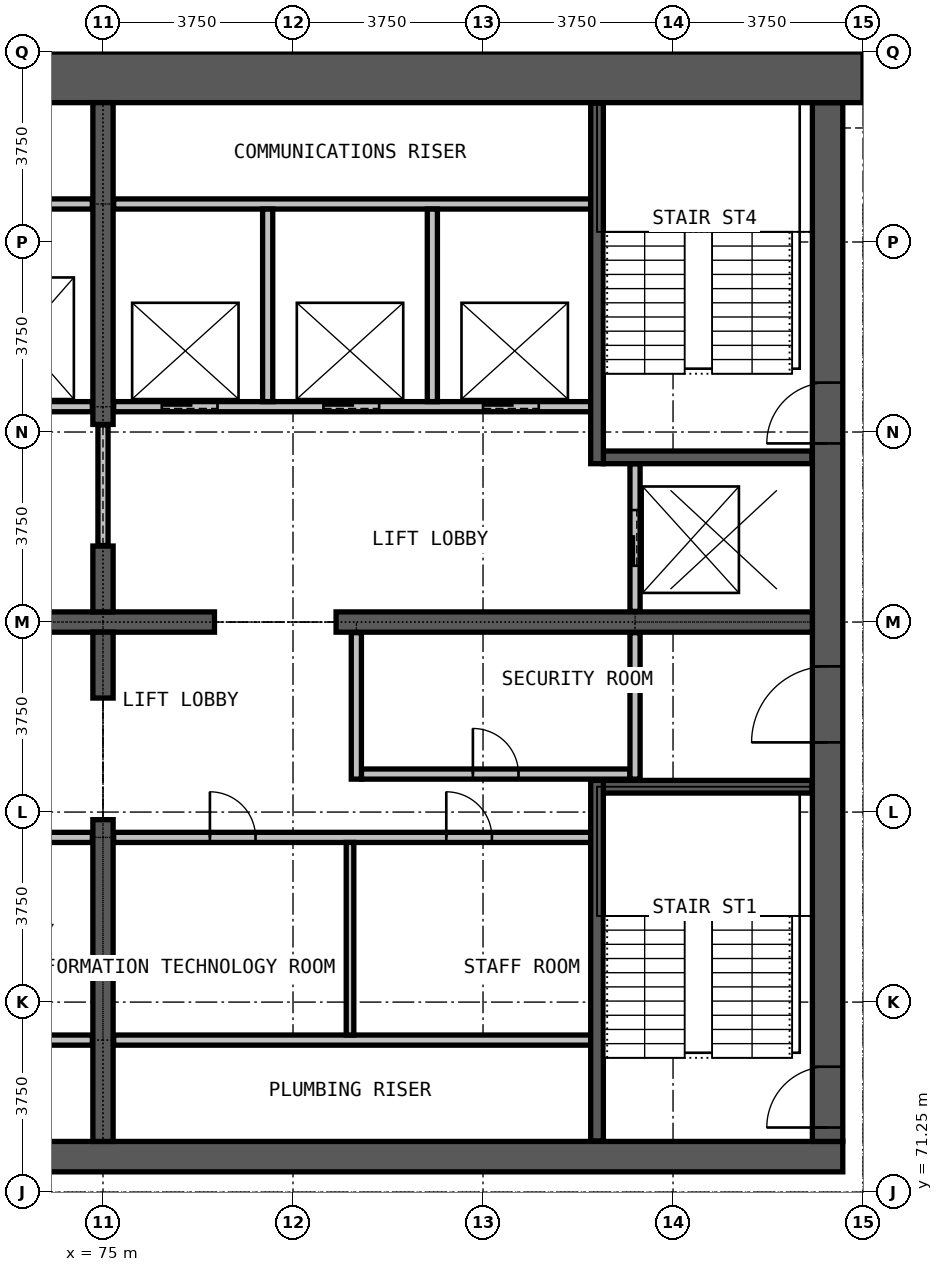
"""IFC4 building model, lengths in metres.
Left out: names, types, materials, properties, quantities, classifications, styles, units other than length and angle.
Written with IfcOpenShell. Run it as: python <this file> out.ifc"""

import sys

from ifc_helpers import new_model, si_unit, direction, frame, frame_2d, origin, place, context, subcontext, project, spatial, rectangle, extrude, element, fill, save


model = new_model("IFC4")
c1 = context("Model", 3, precision=1e-05, world=origin(), true_north=direction((0.0, 1.0)))
c2 = subcontext(c1, "Body", "Model", "MODEL_VIEW")
j1 = project(units=[si_unit("LENGTHUNIT", "METRE"), si_unit("PLANEANGLEUNIT", "RADIAN")], contexts=[c1])
p1 = place(None, origin())
s1 = spatial("IfcSite", under=j1, at=p1, CompositionType="ELEMENT")
p2 = place(p1, origin())
s2 = spatial("IfcBuilding", under=s1, at=p2, CompositionType="ELEMENT")
p3 = place(p2, frame((0.0, 0.0, 206.7)))
s3 = spatial("IfcBuildingStorey", under=s2, at=p3, CompositionType="ELEMENT", Elevation=206.7)
p4 = place(p3, frame((60.4, 71.95, 0.0), z_axis=(0.0, 0.0, 1.0), x_axis=(1.0, 0.0, 0.0)))
e1 = element("IfcWall", 1, at=p4, inside=s3, PredefinedType="SHEAR", context=c2, shape_type="SweptSolid", body=[
    extrude(rectangle(XDim=29.2, YDim=0.6, at=frame_2d((14.6, 0.0))), origin(), (0.0, 0.0, 1.0), 3.6),
])
p5 = place(p3, frame((89.3, 72.25, 0.0), z_axis=(0.0, 0.0, 1.0), x_axis=(0.0, 1.0, 0.0)))
e2 = element("IfcWall", 2, at=p5, inside=s3, PredefinedType="SHEAR", context=c2, shape_type="SweptSolid", body=[
    extrude(rectangle(XDim=20.5, YDim=0.6, at=frame_2d((10.25, 0.0))), origin(), (0.0, 0.0, 1.0), 3.6),
])
p6 = place(p5, frame((0.275, 0.0, 0.0)))
e3 = element("IfcOpeningElement", 3, at=p6, cuts=e2, PredefinedType="OPENING", context=c2, shape_type="SweptSolid", body=[
    extrude(rectangle(XDim=1.2, YDim=2.2, at=frame_2d((0.6, 1.1))), frame((0.0, 0.31, 0.0), z_axis=(0.0, -1.0, 0.0), x_axis=(1.0, 0.0, 0.0)), (0.0, 0.0, 1.0), 0.62),
])
p7 = place(p5, frame((13.775, 0.0, 0.0)))
e4 = element("IfcOpeningElement", 4, at=p7, cuts=e2, PredefinedType="OPENING", context=c2, shape_type="SweptSolid", body=[
    extrude(rectangle(XDim=1.2, YDim=2.2, at=frame_2d((0.6, 1.1))), frame((0.0, 0.31, 0.0), z_axis=(0.0, -1.0, 0.0), x_axis=(1.0, 0.0, 0.0)), (0.0, 0.0, 1.0), 0.62),
])
p8 = place(p5, frame((7.875, 0.0, 0.0)))
e5 = element("IfcOpeningElement", 5, at=p8, cuts=e2, PredefinedType="OPENING", context=c2, shape_type="SweptSolid", body=[
    extrude(rectangle(XDim=1.5, YDim=2.2, at=frame_2d((0.75, 1.1))), frame((0.0, 0.31, 0.0), z_axis=(0.0, -1.0, 0.0), x_axis=(1.0, 0.0, 0.0)), (0.0, 0.0, 1.0), 0.62),
])
p9 = place(p3, frame((90.0, 93.25, 0.0), z_axis=(0.0, 0.0, 1.0), x_axis=(-1.0, 0.0, 0.0)))
e6 = element("IfcWall", 6, at=p9, inside=s3, PredefinedType="SHEAR", context=c2, shape_type="SweptSolid", body=[
    extrude(rectangle(XDim=30.0, YDim=1.0, at=frame_2d((15.0, 0.0))), origin(), (0.0, 0.0, 1.0), 3.6),
])
p10 = place(p3, frame((72.8, 82.5, 0.0), z_axis=(0.0, 0.0, 1.0), x_axis=(1.0, 0.0, 0.0)))
e7 = element("IfcWall", 7, at=p10, inside=s3, PredefinedType="SHEAR", context=c2, shape_type="SweptSolid", body=[
    extrude(rectangle(XDim=4.4, YDim=0.4, at=frame_2d((2.2, 0.0))), origin(), (0.0, 0.0, 1.0), 3.6),
])
p11 = place(p3, frame((79.6, 82.5, 0.0), z_axis=(0.0, 0.0, 1.0), x_axis=(1.0, 0.0, 0.0)))
e8 = element("IfcWall", 8, at=p11, inside=s3, PredefinedType="SHEAR", context=c2, shape_type="SweptSolid", body=[
    extrude(rectangle(XDim=9.4, YDim=0.4, at=frame_2d((4.7, 0.0))), origin(), (0.0, 0.0, 1.0), 3.6),
])
p12 = place(p3, frame((75.0, 72.25, 0.0), z_axis=(0.0, 0.0, 1.0), x_axis=(0.0, 1.0, 0.0)))
e9 = element("IfcWall", 9, at=p12, inside=s3, PredefinedType="SHEAR", context=c2, shape_type="SweptSolid", body=[
    extrude(rectangle(XDim=6.35, YDim=0.4, at=frame_2d((3.175, 0.0))), origin(), (0.0, 0.0, 1.0), 3.6),
])
for number, where, z_axis, x_axis in (
    (10, (75.0, 81.0, 0.0), (0.0, 0.0, 1.0), (0.0, 1.0, 0.0)),
    (11, (75.0, 82.7, 0.0), (0.0, 0.0, 1.0), (0.0, 1.0, 0.0)),
):
    element("IfcWall", number, at=place(p3, frame(where, z_axis=z_axis, x_axis=x_axis)), inside=s3, PredefinedType="SHEAR", context=c2, shape_type="SweptSolid", body=[
        extrude(rectangle(XDim=1.3, YDim=0.4, at=frame_2d((0.65, 0.0))), origin(), (0.0, 0.0, 1.0), 3.6),
    ])
p13 = place(p3, frame((75.0, 86.4, 0.0), z_axis=(0.0, 0.0, 1.0), x_axis=(0.0, 1.0, 0.0)))
e12 = element("IfcWall", 12, at=p13, inside=s3, PredefinedType="SHEAR", context=c2, shape_type="SweptSolid", body=[
    extrude(rectangle(XDim=6.35, YDim=0.4, at=frame_2d((3.175, 0.0))), origin(), (0.0, 0.0, 1.0), 3.6),
])
for number, where, z_axis, x_axis in (
    (13, (65.375, 74.25, 0.0), (0.0, 0.0, 1.0), (1.0, 0.0, 0.0)),
    (14, (75.21, 74.25, 0.0), (0.0, 0.0, 1.0), (1.0, 0.0, 0.0)),
):
    element("IfcWall", number, at=place(p3, frame(where, z_axis=z_axis, x_axis=x_axis)), inside=s3, PredefinedType="PARTITIONING", context=c2, shape_type="SweptSolid", body=[
        extrude(rectangle(XDim=9.415, YDim=0.2, at=frame_2d((4.708, 0.0))), origin(), (0.0, 0.0, 1.0), 3.3),
    ])
p14 = place(p3, frame((65.375, 78.25, 0.0), z_axis=(0.0, 0.0, 1.0), x_axis=(1.0, 0.0, 0.0)))
e15 = element("IfcWall", 15, at=p14, inside=s3, PredefinedType="PARTITIONING", context=c2, shape_type="SweptSolid", body=[
    extrude(rectangle(XDim=9.415, YDim=0.2, at=frame_2d((4.708, 0.0))), origin(), (0.0, 0.0, 1.0), 3.3),
])
p15 = place(p14, frame((1.0, 0.0, 0.0)))
e16 = element("IfcOpeningElement", 16, at=p15, cuts=e15, PredefinedType="OPENING", context=c2, shape_type="SweptSolid", body=[
    extrude(rectangle(XDim=0.9, YDim=2.2, at=frame_2d((0.45, 1.1))), frame((0.0, 0.11, 0.0), z_axis=(0.0, -1.0, 0.0), x_axis=(1.0, 0.0, 0.0)), (0.0, 0.0, 1.0), 0.22),
])
p16 = place(p14, frame((5.665, 0.0, 0.0)))
e17 = element("IfcOpeningElement", 17, at=p16, cuts=e15, PredefinedType="OPENING", context=c2, shape_type="SweptSolid", body=[
    extrude(rectangle(XDim=0.9, YDim=2.2, at=frame_2d((0.45, 1.1))), frame((0.0, 0.11, 0.0), z_axis=(0.0, -1.0, 0.0), x_axis=(1.0, 0.0, 0.0)), (0.0, 0.0, 1.0), 0.22),
])
p17 = place(p3, frame((75.21, 78.25, 0.0), z_axis=(0.0, 0.0, 1.0), x_axis=(1.0, 0.0, 0.0)))
e18 = element("IfcWall", 18, at=p17, inside=s3, PredefinedType="PARTITIONING", context=c2, shape_type="SweptSolid", body=[
    extrude(rectangle(XDim=9.415, YDim=0.2, at=frame_2d((4.708, 0.0))), origin(), (0.0, 0.0, 1.0), 3.3),
])
p18 = place(p17, frame((1.9, 0.0, 0.0)))
e19 = element("IfcOpeningElement", 19, at=p18, cuts=e18, PredefinedType="OPENING", context=c2, shape_type="SweptSolid", body=[
    extrude(rectangle(XDim=0.9, YDim=2.2, at=frame_2d((0.45, 1.1))), frame((0.0, 0.11, 0.0), z_axis=(0.0, -1.0, 0.0), x_axis=(1.0, 0.0, 0.0)), (0.0, 0.0, 1.0), 0.22),
])
p19 = place(p17, frame((6.565, 0.0, 0.0)))
e20 = element("IfcOpeningElement", 20, at=p19, cuts=e18, PredefinedType="OPENING", context=c2, shape_type="SweptSolid", body=[
    extrude(rectangle(XDim=0.9, YDim=2.2, at=frame_2d((0.45, 1.1))), frame((0.0, 0.11, 0.0), z_axis=(0.0, -1.0, 0.0), x_axis=(1.0, 0.0, 0.0)), (0.0, 0.0, 1.0), 0.22),
])
p20 = place(p3, frame((80.1, 79.5, 0.0), z_axis=(0.0, 0.0, 1.0), x_axis=(1.0, 0.0, 0.0)))
e21 = element("IfcWall", 21, at=p20, inside=s3, PredefinedType="PARTITIONING", context=c2, shape_type="SweptSolid", body=[
    extrude(rectangle(XDim=5.3, YDim=0.2, at=frame_2d((2.65, 0.0))), origin(), (0.0, 0.0, 1.0), 3.3),
])
p21 = place(p20, frame((2.2, 0.0, 0.0)))
e22 = element("IfcOpeningElement", 22, at=p21, cuts=e21, PredefinedType="OPENING", context=c2, shape_type="SweptSolid", body=[
    extrude(rectangle(XDim=0.9, YDim=2.2, at=frame_2d((0.45, 1.1))), frame((0.0, 0.11, 0.0), z_axis=(0.0, -1.0, 0.0), x_axis=(1.0, 0.0, 0.0)), (0.0, 0.0, 1.0), 0.22),
])
p22 = place(p3, frame((75.0, 84.01, 0.0), z_axis=(0.0, 0.0, 1.0), x_axis=(0.0, 1.0, 0.0)))
e23 = element("IfcWall", 23, at=p22, inside=s3, PredefinedType="PARTITIONING", context=c2, shape_type="SweptSolid", body=[
    extrude(rectangle(XDim=2.38, YDim=0.2, at=frame_2d((1.19, 0.0))), origin(), (0.0, 0.0, 1.0), 2.4),
])
for number, where, z_axis, x_axis in (
    (24, (80.0, 79.4, 0.0), (0.0, 0.0, 1.0), (0.0, 1.0, 0.0)),
    (25, (85.5, 79.4, 0.0), (0.0, 0.0, 1.0), (0.0, 1.0, 0.0)),
):
    element("IfcWall", number, at=place(p3, frame(where, z_axis=z_axis, x_axis=x_axis)), inside=s3, PredefinedType="PARTITIONING", context=c2, shape_type="SweptSolid", body=[
        extrude(rectangle(XDim=2.89, YDim=0.2, at=frame_2d((1.445, 0.0))), origin(), (0.0, 0.0, 1.0), 3.3),
    ])
p23 = place(p3, frame((79.875, 74.35, 0.0), z_axis=(0.0, 0.0, 1.0), x_axis=(0.0, 1.0, 0.0)))
e26 = element("IfcWall", 26, at=p23, inside=s3, PredefinedType="PARTITIONING", context=c2, shape_type="SweptSolid", body=[
    extrude(rectangle(XDim=3.8, YDim=0.15, at=frame_2d((1.9, 0.0))), origin(), (0.0, 0.0, 1.0), 3.3),
])
p24 = place(p3, frame((65.375, 86.75, 0.0), z_axis=(0.0, 0.0, 1.0), x_axis=(1.0, 0.0, 0.0)))
e27 = element("IfcWall", 27, at=p24, inside=s3, PredefinedType="PARTITIONING", context=c2, shape_type="SweptSolid", body=[
    extrude(rectangle(XDim=9.415, YDim=0.2, at=frame_2d((4.708, 0.0))), origin(), (0.0, 0.0, 1.0), 3.3),
])
p25 = place(p24, frame((1.0, 0.0, 0.0)))
e28 = element("IfcOpeningElement", 28, at=p25, cuts=e27, PredefinedType="OPENING", context=c2, shape_type="SweptSolid", body=[
    extrude(rectangle(XDim=1.1, YDim=2.2, at=frame_2d((0.55, 1.1))), frame((0.0, 0.11, 0.0), z_axis=(0.0, -1.0, 0.0), x_axis=(1.0, 0.0, 0.0)), (0.0, 0.0, 1.0), 0.22),
])
p26 = place(p24, frame((4.175, 0.0, 0.0)))
e29 = element("IfcOpeningElement", 29, at=p26, cuts=e27, PredefinedType="OPENING", context=c2, shape_type="SweptSolid", body=[
    extrude(rectangle(XDim=1.1, YDim=2.2, at=frame_2d((0.55, 1.1))), frame((0.0, 0.11, 0.0), z_axis=(0.0, -1.0, 0.0), x_axis=(1.0, 0.0, 0.0)), (0.0, 0.0, 1.0), 0.22),
])
p27 = place(p24, frame((7.325, 0.0, 0.0)))
e30 = element("IfcOpeningElement", 30, at=p27, cuts=e27, PredefinedType="OPENING", context=c2, shape_type="SweptSolid", body=[
    extrude(rectangle(XDim=1.1, YDim=2.2, at=frame_2d((0.55, 1.1))), frame((0.0, 0.11, 0.0), z_axis=(0.0, -1.0, 0.0), x_axis=(1.0, 0.0, 0.0)), (0.0, 0.0, 1.0), 0.22),
])
p28 = place(p3, frame((75.21, 86.75, 0.0), z_axis=(0.0, 0.0, 1.0), x_axis=(1.0, 0.0, 0.0)))
e31 = element("IfcWall", 31, at=p28, inside=s3, PredefinedType="PARTITIONING", context=c2, shape_type="SweptSolid", body=[
    extrude(rectangle(XDim=9.415, YDim=0.2, at=frame_2d((4.708, 0.0))), origin(), (0.0, 0.0, 1.0), 3.3),
])
p29 = place(p28, frame((0.95, 0.0, 0.0)))
e32 = element("IfcOpeningElement", 32, at=p29, cuts=e31, PredefinedType="OPENING", context=c2, shape_type="SweptSolid", body=[
    extrude(rectangle(XDim=1.1, YDim=2.2, at=frame_2d((0.55, 1.1))), frame((0.0, 0.11, 0.0), z_axis=(0.0, -1.0, 0.0), x_axis=(1.0, 0.0, 0.0)), (0.0, 0.0, 1.0), 0.22),
])
p30 = place(p28, frame((4.14, 0.0, 0.0)))
e33 = element("IfcOpeningElement", 33, at=p30, cuts=e31, PredefinedType="OPENING", context=c2, shape_type="SweptSolid", body=[
    extrude(rectangle(XDim=1.1, YDim=2.2, at=frame_2d((0.55, 1.1))), frame((0.0, 0.11, 0.0), z_axis=(0.0, -1.0, 0.0), x_axis=(1.0, 0.0, 0.0)), (0.0, 0.0, 1.0), 0.22),
])
p31 = place(p28, frame((7.29, 0.0, 0.0)))
e34 = element("IfcOpeningElement", 34, at=p31, cuts=e31, PredefinedType="OPENING", context=c2, shape_type="SweptSolid", body=[
    extrude(rectangle(XDim=1.1, YDim=2.2, at=frame_2d((0.55, 1.1))), frame((0.0, 0.11, 0.0), z_axis=(0.0, -1.0, 0.0), x_axis=(1.0, 0.0, 0.0)), (0.0, 0.0, 1.0), 0.22),
])
for number, where, z_axis, x_axis in (
    (35, (65.375, 90.75, 0.0), (0.0, 0.0, 1.0), (1.0, 0.0, 0.0)),
    (36, (75.21, 90.75, 0.0), (0.0, 0.0, 1.0), (1.0, 0.0, 0.0)),
):
    element("IfcWall", number, at=place(p3, frame(where, z_axis=z_axis, x_axis=x_axis)), inside=s3, PredefinedType="PARTITIONING", context=c2, shape_type="SweptSolid", body=[
        extrude(rectangle(XDim=9.415, YDim=0.2, at=frame_2d((4.708, 0.0))), origin(), (0.0, 0.0, 1.0), 3.3),
    ])
for number, where, z_axis, x_axis in (
    (37, (78.25, 86.85, 0.0), (0.0, 0.0, 1.0), (0.0, 1.0, 0.0)),
    (38, (81.5, 86.85, 0.0), (0.0, 0.0, 1.0), (0.0, 1.0, 0.0)),
):
    element("IfcWall", number, at=place(p3, frame(where, z_axis=z_axis, x_axis=x_axis)), inside=s3, PredefinedType="PARTITIONING", context=c2, shape_type="SweptSolid", body=[
        extrude(rectangle(XDim=3.8, YDim=0.2, at=frame_2d((1.9, 0.0))), origin(), (0.0, 0.0, 1.0), 3.3),
    ])
p32 = place(p3, frame((85.5, 82.71, 0.0), z_axis=(0.0, 0.0, 1.0), x_axis=(0.0, 1.0, 0.0)))
e39 = element("IfcWall", 39, at=p32, inside=s3, PredefinedType="PARTITIONING", context=c2, shape_type="SweptSolid", body=[
    extrude(rectangle(XDim=2.915, YDim=0.2, at=frame_2d((1.458, 0.0))), origin(), (0.0, 0.0, 1.0), 3.3),
])
p33 = place(p32, frame((0.9, 0.0, 0.0)))
e40 = element("IfcOpeningElement", 40, at=p33, cuts=e39, PredefinedType="OPENING", context=c2, shape_type="SweptSolid", body=[
    extrude(rectangle(XDim=1.1, YDim=2.2, at=frame_2d((0.55, 1.1))), frame((0.0, 0.11, 0.0), z_axis=(0.0, -1.0, 0.0), x_axis=(1.0, 0.0, 0.0)), (0.0, 0.0, 1.0), 0.22),
])
for number, where, z_axis, x_axis in (
    (41, (84.875, 79.25, 0.0), (0.0, 0.0, 1.0), (1.0, 0.0, 0.0)),
    (42, (84.875, 85.75, 0.0), (0.0, 0.0, 1.0), (1.0, 0.0, 0.0)),
):
    element("IfcWall", number, at=place(p3, frame(where, z_axis=z_axis, x_axis=x_axis)), inside=s3, PredefinedType="PARTITIONING", context=c2, shape_type="SweptSolid", body=[
        extrude(rectangle(XDim=4.115, YDim=0.25, at=frame_2d((2.058, 0.0))), origin(), (0.0, 0.0, 1.0), 3.3),
    ])
for number, where, z_axis, x_axis in (
    (43, (84.75, 72.26, 0.0), (0.0, 0.0, 1.0), (0.0, 1.0, 0.0)),
    (44, (84.75, 85.625, 0.0), (0.0, 0.0, 1.0), (0.0, 1.0, 0.0)),
):
    element("IfcWall", number, at=place(p3, frame(where, z_axis=z_axis, x_axis=x_axis)), inside=s3, PredefinedType="PARTITIONING", context=c2, shape_type="SweptSolid", body=[
        extrude(rectangle(XDim=7.115, YDim=0.25, at=frame_2d((3.558, 0.0))), origin(), (0.0, 0.0, 1.0), 3.3),
    ])
p34 = place(p29, origin())
e45 = element("IfcDoor", 45, at=p34, inside=s3, OperationType="DOUBLE_DOOR_SLIDING", PredefinedType="DOOR", context=c2, shape_type="SweptSolid", body=[
    extrude(rectangle(XDim=1.1, YDim=2.2, at=frame_2d((0.55, 1.1))), frame((0.0, 0.025, 0.0), z_axis=(0.0, -1.0, 0.0), x_axis=(1.0, 0.0, 0.0)), (0.0, 0.0, 1.0), 0.05),
])
fill(e32, e45)
p35 = place(p30, origin())
e46 = element("IfcDoor", 46, at=p35, inside=s3, OperationType="DOUBLE_DOOR_SLIDING", PredefinedType="DOOR", context=c2, shape_type="SweptSolid", body=[
    extrude(rectangle(XDim=1.1, YDim=2.2, at=frame_2d((0.55, 1.1))), frame((0.0, 0.025, 0.0), z_axis=(0.0, -1.0, 0.0), x_axis=(1.0, 0.0, 0.0)), (0.0, 0.0, 1.0), 0.05),
])
fill(e33, e46)
p36 = place(p31, origin())
e47 = element("IfcDoor", 47, at=p36, inside=s3, OperationType="DOUBLE_DOOR_SLIDING", PredefinedType="DOOR", context=c2, shape_type="SweptSolid", body=[
    extrude(rectangle(XDim=1.1, YDim=2.2, at=frame_2d((0.55, 1.1))), frame((0.0, 0.025, 0.0), z_axis=(0.0, -1.0, 0.0), x_axis=(1.0, 0.0, 0.0)), (0.0, 0.0, 1.0), 0.05),
])
fill(e34, e47)
p37 = place(p33, origin())
e48 = element("IfcDoor", 48, at=p37, inside=s3, OperationType="DOUBLE_DOOR_SLIDING", PredefinedType="DOOR", context=c2, shape_type="SweptSolid", body=[
    extrude(rectangle(XDim=1.1, YDim=2.2, at=frame_2d((0.55, 1.1))), frame((0.0, 0.025, 0.0), z_axis=(0.0, -1.0, 0.0), x_axis=(1.0, 0.0, 0.0)), (0.0, 0.0, 1.0), 0.05),
])
fill(e40, e48)
p38 = place(p6, origin())
e49 = element("IfcDoor", 49, at=p38, inside=s3, OperationType="SINGLE_SWING_RIGHT", PredefinedType="DOOR", context=c2, shape_type="SweptSolid", body=[
    extrude(rectangle(XDim=1.2, YDim=2.2, at=frame_2d((0.6, 1.1))), frame((0.0, 0.025, 0.0), z_axis=(0.0, -1.0, 0.0), x_axis=(1.0, 0.0, 0.0)), (0.0, 0.0, 1.0), 0.05),
])
fill(e3, e49)
p39 = place(p7, origin())
e50 = element("IfcDoor", 50, at=p39, inside=s3, OperationType="SINGLE_SWING_LEFT", PredefinedType="DOOR", context=c2, shape_type="SweptSolid", body=[
    extrude(rectangle(XDim=1.2, YDim=2.2, at=frame_2d((0.6, 1.1))), frame((0.0, 0.025, 0.0), z_axis=(0.0, -1.0, 0.0), x_axis=(1.0, 0.0, 0.0)), (0.0, 0.0, 1.0), 0.05),
])
fill(e4, e50)
p40 = place(p8, origin())
e51 = element("IfcDoor", 51, at=p40, inside=s3, OperationType="DOUBLE_DOOR_SINGLE_SWING", PredefinedType="DOOR", context=c2, shape_type="SweptSolid", body=[
    extrude(rectangle(XDim=1.5, YDim=2.2, at=frame_2d((0.75, 1.1))), frame((0.0, 0.025, 0.0), z_axis=(0.0, -1.0, 0.0), x_axis=(1.0, 0.0, 0.0)), (0.0, 0.0, 1.0), 0.05),
])
fill(e5, e51)
p41 = place(p21, origin())
e52 = element("IfcDoor", 52, at=p41, inside=s3, OperationType="SINGLE_SWING_RIGHT", PredefinedType="DOOR", context=c2, shape_type="SweptSolid", body=[
    extrude(rectangle(XDim=0.9, YDim=2.2, at=frame_2d((0.45, 1.1))), frame((0.0, 0.025, 0.0), z_axis=(0.0, -1.0, 0.0), x_axis=(1.0, 0.0, 0.0)), (0.0, 0.0, 1.0), 0.05),
])
fill(e22, e52)
p42 = place(p18, origin())
e53 = element("IfcDoor", 53, at=p42, inside=s3, OperationType="SINGLE_SWING_LEFT", PredefinedType="DOOR", context=c2, shape_type="SweptSolid", body=[
    extrude(rectangle(XDim=0.9, YDim=2.2, at=frame_2d((0.45, 1.1))), frame((0.0, 0.025, 0.0), z_axis=(0.0, -1.0, 0.0), x_axis=(1.0, 0.0, 0.0)), (0.0, 0.0, 1.0), 0.05),
])
fill(e19, e53)
p43 = place(p19, origin())
e54 = element("IfcDoor", 54, at=p43, inside=s3, OperationType="SINGLE_SWING_RIGHT", PredefinedType="DOOR", context=c2, shape_type="SweptSolid", body=[
    extrude(rectangle(XDim=0.9, YDim=2.2, at=frame_2d((0.45, 1.1))), frame((0.0, 0.025, 0.0), z_axis=(0.0, -1.0, 0.0), x_axis=(1.0, 0.0, 0.0)), (0.0, 0.0, 1.0), 0.05),
])
fill(e20, e54)
save(model, sys.argv[1])
